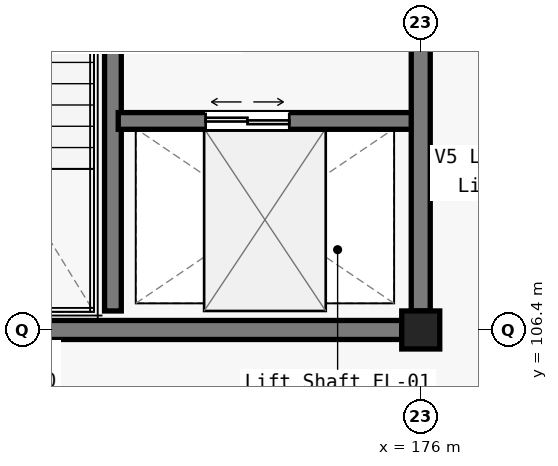
"""IFC4 building model, lengths in metres.
Left out: names, types, materials, properties, quantities, classifications, styles, units other than length and angle.
Written with IfcOpenShell. Run it as: python <this file> out.ifc"""

import sys

from ifc_helpers import new_model, si_unit, direction, frame, frame_2d, origin, origin_2d, place, context, subcontext, project, spatial, rectangle, extrude, element, fill, save


model = new_model("IFC4")
c1 = context("Model", 3, precision=1e-05, world=origin(), true_north=direction((0.0, 1.0)))
c2 = subcontext(c1, "Body", "Model", "MODEL_VIEW")
j1 = project(units=[si_unit("LENGTHUNIT", "METRE"), si_unit("PLANEANGLEUNIT", "RADIAN")], contexts=[c1])
p1 = place(None, origin())
s1 = spatial("IfcSite", under=j1, at=p1, CompositionType="ELEMENT")
p2 = place(p1, origin())
s2 = spatial("IfcBuilding", under=s1, at=p2, CompositionType="ELEMENT")
p3 = place(p2, frame((0.0, 0.0, 15.0)))
s3 = spatial("IfcBuildingStorey", under=s2, at=p3, CompositionType="ELEMENT", Elevation=15.0)
p4 = place(p3, frame((176.0, 106.4, 0.0), z_axis=(0.0, 0.0, 1.0), x_axis=(1.0, 0.0, 0.0)))
e1 = element("IfcColumn", 1, at=p4, inside=s3, PredefinedType="COLUMN", context=c2, shape_type="SweptSolid", body=[
    extrude(rectangle(XDim=0.5, YDim=0.5, at=origin_2d()), origin(), (0.0, 0.0, 1.0), 4.8),
])
p5 = place(p3, frame((168.3, 106.4, 0.0), z_axis=(0.0, 0.0, 1.0), x_axis=(1.0, 0.0, 0.0)))
e2 = element("IfcWall", 2, at=p5, inside=s3, PredefinedType="SOLIDWALL", context=c2, shape_type="SweptSolid", body=[
    extrude(rectangle(XDim=7.45, YDim=0.25, at=frame_2d((3.725, 0.0))), origin(), (0.0, 0.0, 1.0), 3.655),
])
p6 = place(p3, frame((171.95, 106.65, 0.0), z_axis=(0.0, 0.0, 1.0), x_axis=(0.0, 1.0, 0.0)))
e3 = element("IfcWall", 3, at=p6, inside=s3, PredefinedType="SOLIDWALL", context=c2, shape_type="SweptSolid", body=[
    extrude(rectangle(XDim=7.1, YDim=0.22, at=frame_2d((3.55, 0.0))), origin(), (0.0, 0.0, 1.0), 4.53),
])
p7 = place(p6, frame((5.55, 0.0, 0.0)))
e4 = element("IfcOpeningElement", 4, at=p7, cuts=e3, PredefinedType="OPENING", context=c2, shape_type="SweptSolid", body=[
    extrude(rectangle(XDim=1.2, YDim=2.15, at=frame_2d((0.6, 1.075))), frame((0.0, 0.12, 0.0), z_axis=(0.0, -1.0, 0.0), x_axis=(1.0, 0.0, 0.0)), (0.0, 0.0, 1.0), 0.24),
])
p8 = place(p3, frame((172.02, 109.15, 0.0), z_axis=(0.0, 0.0, 1.0), x_axis=(1.0, 0.0, 0.0)))
e5 = element("IfcWall", 5, at=p8, inside=s3, PredefinedType="SOLIDWALL", context=c2, shape_type="SweptSolid", body=[
    extrude(rectangle(XDim=3.93, YDim=0.22, at=frame_2d((1.965, 0.0))), origin(), (0.0, 0.0, 1.0), 3.905),
])
p9 = place(p8, frame((1.15, 0.0, 0.0)))
e6 = element("IfcOpeningElement", 6, at=p9, cuts=e5, PredefinedType="OPENING", context=c2, shape_type="SweptSolid", body=[
    extrude(rectangle(XDim=1.1, YDim=2.2, at=frame_2d((0.55, 1.1))), frame((0.0, 0.12, 0.0), z_axis=(0.0, -1.0, 0.0), x_axis=(1.0, 0.0, 0.0)), (0.0, 0.0, 1.0), 0.24),
])
p10 = place(p3, frame((176.0, 106.65, 0.0), z_axis=(0.0, 0.0, 1.0), x_axis=(0.0, 1.0, 0.0)))
e7 = element("IfcWall", 7, at=p10, inside=s3, PredefinedType="SOLIDWALL", context=c2, shape_type="SweptSolid", body=[
    extrude(rectangle(XDim=6.95, YDim=0.25, at=frame_2d((3.475, 0.0))), origin(), (0.0, 0.0, 1.0), 3.655),
])
p11 = place(p10, frame((3.6, 0.0, 0.0)))
e8 = element("IfcOpeningElement", 8, at=p11, cuts=e7, PredefinedType="OPENING", context=c2, shape_type="SweptSolid", body=[
    extrude(rectangle(XDim=1.35, YDim=2.2, at=frame_2d((0.675, 1.1))), frame((0.0, 0.135, 0.0), z_axis=(0.0, -1.0, 0.0), x_axis=(1.0, 0.0, 0.0)), (0.0, 0.0, 1.0), 0.27),
])
p12 = place(p9, origin())
e9 = element("IfcDoor", 9, at=p12, inside=s3, OperationType="DOUBLE_DOOR_SLIDING", PredefinedType="DOOR", context=c2, shape_type="SweptSolid", body=[
    extrude(rectangle(XDim=1.1, YDim=2.2, at=frame_2d((0.55, 1.1))), frame((0.0, 0.025, 0.0), z_axis=(0.0, -1.0, 0.0), x_axis=(1.0, 0.0, 0.0)), (0.0, 0.0, 1.0), 0.05),
])
fill(e6, e9)
save(model, sys.argv[1])
